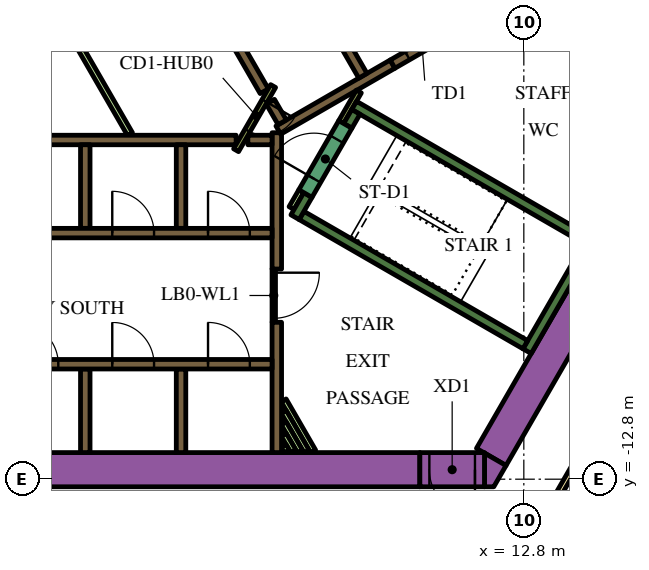
"""IFC4 building model, lengths in metres.
Left out: names, types, materials, properties, quantities, classifications, styles, units other than length and angle.
Written with IfcOpenShell. Run it as: python <this file> out.ifc"""

import sys

from ifc_helpers import new_model, si_unit, direction, frame, frame_2d, origin, place, context, subcontext, project, spatial, polyline, rectangle, outline, extrude, element, fill, save


model = new_model("IFC4")
c1 = context("Model", 3, precision=1e-05, world=origin(), true_north=direction((0.0, 1.0)))
c2 = subcontext(c1, "Body", "Model", "MODEL_VIEW")
j1 = project(units=[si_unit("LENGTHUNIT", "METRE"), si_unit("PLANEANGLEUNIT", "RADIAN")], contexts=[c1])
p1 = place(None, origin())
s1 = spatial("IfcSite", under=j1, at=p1, CompositionType="ELEMENT")
p2 = place(p1, origin())
s2 = spatial("IfcBuilding", under=s1, at=p2, CompositionType="ELEMENT")
p3 = place(p2, frame((0.0, 0.0, 114.9)))
s3 = spatial("IfcBuildingStorey", under=s2, at=p3, CompositionType="ELEMENT", Elevation=114.9)
p4 = place(p3, frame((6.776, 13.364, 0.0), z_axis=(0.0, 0.0, 1.0), x_axis=(0.500004177138, -0.8660229921, 0.0)))
e1 = element("IfcWall", 1, at=p4, inside=s3, PredefinedType="SOLIDWALL", context=c2, shape_type="SweptSolid", body=[
    extrude(rectangle(XDim=20.204, YDim=0.9, at=frame_2d((10.102, 0.0))), origin(), (0.0, 0.0, 1.0), 3.9),
])
p5 = place(p3, frame((11.943, -12.214, 0.0), z_axis=(0.0, 0.0, 1.0), x_axis=(0.49998092645, 0.866036415623, 0.0)))
e2 = element("IfcWall", 2, at=p5, inside=s3, PredefinedType="SOLIDWALL", context=c2, shape_type="SweptSolid", body=[
    extrude(rectangle(XDim=8.83, YDim=0.9, at=frame_2d((4.415, 0.0))), origin(), (0.0, 0.0, 1.0), 3.9),
])
p6 = place(p3, origin())
e3 = element("IfcWall", 3, at=p6, inside=s3, PredefinedType="SOLIDWALL", context=c2, shape_type="SweptSolid", body=[
    extrude(outline(polyline([(12.009, -13.0), (11.764, -13.0), (11.764, -12.113), (12.332, -12.441), (12.009, -13.0)])), origin(), (0.0, 0.0, 1.0), 3.9),
])
p7 = place(p3, frame((-12.019, -12.55, 0.0), z_axis=(0.0, 0.0, 1.0), x_axis=(1.0, 0.0, 0.0)))
e4 = element("IfcWall", 4, at=p7, inside=s3, PredefinedType="SOLIDWALL", context=c2, shape_type="SweptSolid", body=[
    extrude(rectangle(XDim=22.083, YDim=0.9, at=frame_2d((11.042, 0.0))), origin(), (0.0, 0.0, 1.0), 3.9),
])
p8 = place(p3, frame((12.885, -9.431, 0.0), z_axis=(0.0, 0.0, 1.0), x_axis=(0.500020560727, 0.866013532718, 0.0)))
e5 = element("IfcWall", 5, at=p8, inside=s3, PredefinedType="SOLIDWALL", context=c2, shape_type="SweptSolid", body=[
    extrude(rectangle(XDim=3.45, YDim=0.25, at=frame_2d((1.725, 0.0))), origin(), (0.0, 0.0, 1.0), 3.9),
])
p9 = place(p3, frame((12.84, -9.261, 0.0), z_axis=(0.0, 0.0, 1.0), x_axis=(-0.866013990052, 0.500019768644, 0.0)))
e6 = element("IfcWall", 6, at=p9, inside=s3, PredefinedType="SOLIDWALL", context=c2, shape_type="SweptSolid", body=[
    extrude(rectangle(XDim=6.8, YDim=0.25, at=frame_2d((3.4, 0.0))), origin(), (0.0, 0.0, 1.0), 3.9),
])
p10 = place(p3, frame((6.78, -5.906, 0.0), z_axis=(0.0, 0.0, 1.0), x_axis=(0.500223362819, 0.865896406789, 0.0)))
e7 = element("IfcWall", 7, at=p10, inside=s3, PredefinedType="SOLIDWALL", context=c2, shape_type="SweptSolid", body=[
    extrude(rectangle(XDim=0.675, YDim=0.25, at=frame_2d((0.337, 0.0))), origin(), (0.0, 0.0, 1.0), 3.9),
])
p11 = place(p3, frame((8.334, -2.964, 0.0), z_axis=(0.0, 0.0, 1.0), x_axis=(0.866016039709, -0.500016218704, 0.0)))
e8 = element("IfcWall", 8, at=p11, inside=s3, PredefinedType="SOLIDWALL", context=c2, shape_type="SweptSolid", body=[
    extrude(rectangle(XDim=7.05, YDim=0.25, at=frame_2d((3.525, 0.0))), origin(), (0.0, 0.0, 1.0), 3.9),
])
p12 = place(p3, frame((8.168, -3.503, 0.0), z_axis=(0.0, 0.0, 1.0), x_axis=(0.49972245349, 0.866185586049, 0.0)))
e9 = element("IfcWall", 9, at=p12, inside=s3, PredefinedType="SOLIDWALL", context=c2, shape_type="SweptSolid", body=[
    extrude(rectangle(XDim=0.425, YDim=0.25, at=frame_2d((0.212, 0.0))), origin(), (0.0, 0.0, 1.0), 3.9),
])
p13 = place(p3, frame((-5.259, -3.875, 0.0), z_axis=(0.0, 0.0, 1.0), x_axis=(1.0, 0.0, 0.0)))
e10 = element("IfcWall", 10, at=p13, inside=s3, PredefinedType="SOLIDWALL", context=c2, shape_type="SweptSolid", body=[
    extrude(rectangle(XDim=10.489, YDim=0.25, at=frame_2d((5.244, 0.0))), origin(), (0.0, 0.0, 1.0), 3.9),
])
for number, where, z_axis, x_axis in (
    (11, (3.78, -4.0, 0.0), (0.0, 0.0, 1.0), (0.0, -1.0, 0.0)),
    (12, (1.26, -4.0, 0.0), (0.0, 0.0, 1.0), (0.0, -1.0, 0.0)),
):
    element("IfcWall", number, at=place(p3, frame(where, z_axis=z_axis, x_axis=x_axis)), inside=s3, PredefinedType="SOLIDWALL", context=c2, shape_type="SweptSolid", body=[
        extrude(rectangle(XDim=2.2, YDim=0.25, at=frame_2d((1.1, 0.0))), origin(), (0.0, 0.0, 1.0), 3.9),
    ])
p14 = place(p3, frame((6.3, -7.27, 0.0), z_axis=(0.0, 0.0, 1.0), x_axis=(0.0, 1.0, 0.0)))
e13 = element("IfcWall", 13, at=p14, inside=s3, PredefinedType="SOLIDWALL", context=c2, shape_type="SweptSolid", body=[
    extrude(rectangle(XDim=3.586, YDim=0.25, at=frame_2d((1.793, 0.0))), origin(), (0.0, 0.0, 1.0), 3.9),
])
p15 = place(p3, frame((6.3, -12.1, 0.0), z_axis=(0.0, 0.0, 1.0), x_axis=(0.0, 1.0, 0.0)))
e14 = element("IfcWall", 14, at=p15, inside=s3, PredefinedType="SOLIDWALL", context=c2, shape_type="SweptSolid", body=[
    extrude(rectangle(XDim=3.428, YDim=0.25, at=frame_2d((1.714, 0.0))), origin(), (0.0, 0.0, 1.0), 3.9),
])
p16 = place(p3, frame((5.538, -3.875, 0.0), z_axis=(0.0, 0.0, 1.0), x_axis=(1.0, 0.0, 0.0)))
e15 = element("IfcWall", 15, at=p16, inside=s3, PredefinedType="SOLIDWALL", context=c2, shape_type="SweptSolid", body=[
    extrude(rectangle(XDim=0.637, YDim=0.25, at=frame_2d((0.318, 0.0))), origin(), (0.0, 0.0, 1.0), 3.9),
])
for number, where, z_axis, x_axis in (
    (16, (3.78, -12.1, 0.0), (0.0, 0.0, 1.0), (0.0, 1.0, 0.0)),
    (17, (1.26, -12.1, 0.0), (0.0, 0.0, 1.0), (0.0, 1.0, 0.0)),
):
    element("IfcWall", number, at=place(p3, frame(where, z_axis=z_axis, x_axis=x_axis)), inside=s3, PredefinedType="SOLIDWALL", context=c2, shape_type="SweptSolid", body=[
        extrude(rectangle(XDim=2.2, YDim=0.25, at=frame_2d((1.1, 0.0))), origin(), (0.0, 0.0, 1.0), 3.9),
    ])
p17 = place(p3, frame((9.346, -1.879, 0.0), z_axis=(0.0, 0.0, 1.0), x_axis=(-0.866048528039, -0.499959945477, 0.0)))
e18 = element("IfcWall", 18, at=p17, inside=s3, PredefinedType="SOLIDWALL", context=c2, shape_type="SweptSolid", body=[
    extrude(rectangle(XDim=3.47, YDim=0.25, at=frame_2d((1.735, 0.0))), origin(), (0.0, 0.0, 1.0), 3.9),
])
p18 = place(p3, frame((6.13, -2.867, 0.0), z_axis=(0.0, 0.0, 1.0), x_axis=(0.500160776593, -0.865932559475, 0.0)))
e19 = element("IfcWall", 19, at=p18, inside=s3, PredefinedType="SOLIDWALL", context=c2, shape_type="SweptSolid", body=[
    extrude(rectangle(XDim=0.627, YDim=0.25, at=frame_2d((0.313, 0.0))), origin(), (0.0, 0.0, 1.0), 3.9),
])
p19 = place(p3, frame((5.97, -2.591, 0.0), z_axis=(0.0, 0.0, 1.0), x_axis=(-0.499994469932, 0.866028596547, 0.0)))
e20 = element("IfcWall", 20, at=p19, inside=s3, PredefinedType="SOLIDWALL", context=c2, shape_type="SweptSolid", body=[
    extrude(rectangle(XDim=10.488, YDim=0.25, at=frame_2d((5.244, 0.0))), origin(), (0.0, 0.0, 1.0), 3.9),
])
p20 = place(p3, frame((6.48, -10.726, 0.0), z_axis=(0.0, 0.0, 1.0), x_axis=(0.500017819788, -0.86601511528, 0.0)))
e21 = element("IfcWall", 21, at=p20, inside=s3, PredefinedType="PARTITIONING", context=c2, shape_type="SweptSolid", body=[
    extrude(rectangle(XDim=1.55, YDim=0.15, at=frame_2d((0.775, 0.0))), origin(), (0.0, 0.0, 1.0), 2.75),
])
p21 = place(p3, frame((6.48, -11.026, 0.0), z_axis=(0.0, 0.0, 1.0), x_axis=(0.49995654735, -0.86605048973, 0.0)))
e22 = element("IfcWall", 22, at=p21, inside=s3, PredefinedType="PARTITIONING", context=c2, shape_type="SweptSolid", body=[
    extrude(rectangle(XDim=1.204, YDim=0.15, at=frame_2d((0.602, 0.0))), origin(), (0.0, 0.0, 1.0), 2.75),
])
p22 = place(p3, frame((6.48, -11.326, 0.0), z_axis=(0.0, 0.0, 1.0), x_axis=(0.500059337743, -0.865991142412, 0.0)))
e23 = element("IfcWall", 23, at=p22, inside=s3, PredefinedType="PARTITIONING", context=c2, shape_type="SweptSolid", body=[
    extrude(rectangle(XDim=0.857, YDim=0.15, at=frame_2d((0.429, 0.0))), origin(), (0.0, 0.0, 1.0), 2.75),
])
p23 = place(p3, frame((6.48, -11.626, 0.0), z_axis=(0.0, 0.0, 1.0), x_axis=(0.500301480982, -0.865851273677, 0.0)))
e24 = element("IfcWall", 24, at=p23, inside=s3, PredefinedType="PARTITIONING", context=c2, shape_type="SweptSolid", body=[
    extrude(rectangle(XDim=0.511, YDim=0.15, at=frame_2d((0.255, 0.0))), origin(), (0.0, 0.0, 1.0), 2.75),
])
p24 = place(p3, frame((6.48, -11.926, 0.0), z_axis=(0.0, 0.0, 1.0), x_axis=(0.500450775723, -0.86576499183, 0.0)))
e25 = element("IfcWall", 25, at=p24, inside=s3, PredefinedType="PARTITIONING", context=c2, shape_type="SweptSolid", body=[
    extrude(rectangle(XDim=0.164, YDim=0.15, at=frame_2d((0.082, 0.0))), origin(), (0.0, 0.0, 1.0), 2.75),
])
p25 = place(p3, frame((6.945, -5.222, 0.0), z_axis=(0.0, 0.0, 1.0), x_axis=(-0.499818422106, -0.866130212453, 0.0)))
e26 = element("IfcWall", 26, at=p25, inside=s3, PredefinedType="PARTITIONING", context=c2, shape_type="SweptSolid", body=[
    extrude(rectangle(XDim=0.514, YDim=0.15, at=frame_2d((0.257, 0.0))), origin(), (0.0, 0.0, 1.0), 2.75),
])
p26 = place(p3, frame((8.459, -2.599, 0.0), z_axis=(0.0, 0.0, 1.0), x_axis=(-0.500041054325, -0.866001699761, 0.0)))
e27 = element("IfcWall", 27, at=p26, inside=s3, PredefinedType="PARTITIONING", context=c2, shape_type="SweptSolid", body=[
    extrude(rectangle(XDim=0.929, YDim=0.15, at=frame_2d((0.464, 0.0))), origin(), (0.0, 0.0, 1.0), 3.9),
])
p27 = place(p3, frame((2.435, -3.718, 0.0), z_axis=(0.0, 0.0, 1.0), x_axis=(-0.499985176046, 0.866033962229, 0.0)))
e28 = element("IfcWall", 28, at=p27, inside=s3, PredefinedType="PARTITIONING", context=c2, shape_type="SweptSolid", body=[
    extrude(rectangle(XDim=8.875, YDim=0.15, at=frame_2d((4.438, 0.0))), origin(), (0.0, 0.0, 1.0), 2.75),
])
p28 = place(p3, frame((-6.175, -9.775, 0.0), z_axis=(0.0, 0.0, 1.0), x_axis=(1.0, 0.0, 0.0)))
e29 = element("IfcWall", 29, at=p28, inside=s3, PredefinedType="SOLIDWALL", context=c2, shape_type="SweptSolid", body=[
    extrude(rectangle(XDim=12.35, YDim=0.25, at=frame_2d((6.175, 0.0))), origin(), (0.0, 0.0, 1.0), 3.9),
])
p29 = place(p28, frame((0.585, 0.0, 0.0)))
e30 = element("IfcOpeningElement", 30, at=p29, cuts=e29, PredefinedType="OPENING", context=c2, shape_type="SweptSolid", body=[
    extrude(rectangle(XDim=1.1, YDim=2.1, at=frame_2d((0.55, 1.05))), frame((0.0, 0.135, 0.0), z_axis=(0.0, -1.0, 0.0), x_axis=(1.0, 0.0, 0.0)), (0.0, 0.0, 1.0), 0.27),
])
p30 = place(p28, frame((3.105, 0.0, 0.0)))
e31 = element("IfcOpeningElement", 31, at=p30, cuts=e29, PredefinedType="OPENING", context=c2, shape_type="SweptSolid", body=[
    extrude(rectangle(XDim=1.1, YDim=2.1, at=frame_2d((0.55, 1.05))), frame((0.0, 0.135, 0.0), z_axis=(0.0, -1.0, 0.0), x_axis=(1.0, 0.0, 0.0)), (0.0, 0.0, 1.0), 0.27),
])
p31 = place(p28, frame((5.625, 0.0, 0.0)))
e32 = element("IfcOpeningElement", 32, at=p31, cuts=e29, PredefinedType="OPENING", context=c2, shape_type="SweptSolid", body=[
    extrude(rectangle(XDim=1.1, YDim=2.1, at=frame_2d((0.55, 1.05))), frame((0.0, 0.135, 0.0), z_axis=(0.0, -1.0, 0.0), x_axis=(1.0, 0.0, 0.0)), (0.0, 0.0, 1.0), 0.27),
])
p32 = place(p28, frame((8.145, 0.0, 0.0)))
e33 = element("IfcOpeningElement", 33, at=p32, cuts=e29, PredefinedType="OPENING", context=c2, shape_type="SweptSolid", body=[
    extrude(rectangle(XDim=1.1, YDim=2.1, at=frame_2d((0.55, 1.05))), frame((0.0, 0.135, 0.0), z_axis=(0.0, -1.0, 0.0), x_axis=(1.0, 0.0, 0.0)), (0.0, 0.0, 1.0), 0.27),
])
p33 = place(p28, frame((10.665, 0.0, 0.0)))
e34 = element("IfcOpeningElement", 34, at=p33, cuts=e29, PredefinedType="OPENING", context=c2, shape_type="SweptSolid", body=[
    extrude(rectangle(XDim=1.1, YDim=2.1, at=frame_2d((0.55, 1.05))), frame((0.0, 0.135, 0.0), z_axis=(0.0, -1.0, 0.0), x_axis=(1.0, 0.0, 0.0)), (0.0, 0.0, 1.0), 0.27),
])
p34 = place(p3, frame((-6.175, -6.325, 0.0), z_axis=(0.0, 0.0, 1.0), x_axis=(1.0, 0.0, 0.0)))
e35 = element("IfcWall", 35, at=p34, inside=s3, PredefinedType="SOLIDWALL", context=c2, shape_type="SweptSolid", body=[
    extrude(rectangle(XDim=12.35, YDim=0.25, at=frame_2d((6.175, 0.0))), origin(), (0.0, 0.0, 1.0), 3.9),
])
p35 = place(p34, frame((3.205, 0.0, 0.0)))
e36 = element("IfcOpeningElement", 36, at=p35, cuts=e35, PredefinedType="OPENING", context=c2, shape_type="SweptSolid", body=[
    extrude(rectangle(XDim=0.9, YDim=2.1, at=frame_2d((0.45, 1.05))), frame((0.0, 0.135, 0.0), z_axis=(0.0, -1.0, 0.0), x_axis=(1.0, 0.0, 0.0)), (0.0, 0.0, 1.0), 0.27),
])
p36 = place(p34, frame((8.145, 0.0, 0.0)))
e37 = element("IfcOpeningElement", 37, at=p36, cuts=e35, PredefinedType="OPENING", context=c2, shape_type="SweptSolid", body=[
    extrude(rectangle(XDim=1.1, YDim=2.1, at=frame_2d((0.55, 1.05))), frame((0.0, 0.135, 0.0), z_axis=(0.0, -1.0, 0.0), x_axis=(1.0, 0.0, 0.0)), (0.0, 0.0, 1.0), 0.27),
])
p37 = place(p34, frame((10.665, 0.0, 0.0)))
e38 = element("IfcOpeningElement", 38, at=p37, cuts=e35, PredefinedType="OPENING", context=c2, shape_type="SweptSolid", body=[
    extrude(rectangle(XDim=1.1, YDim=2.1, at=frame_2d((0.55, 1.05))), frame((0.0, 0.135, 0.0), z_axis=(0.0, -1.0, 0.0), x_axis=(1.0, 0.0, 0.0)), (0.0, 0.0, 1.0), 0.27),
])
p38 = place(p3, frame((8.565, -2.185, 0.0), z_axis=(0.0, 0.0, 1.0), x_axis=(-0.499997954832, 0.866026584559, 0.0)))
e39 = element("IfcWall", 39, at=p38, inside=s3, PredefinedType="SOLIDWALL", context=c2, shape_type="SweptSolid", body=[
    extrude(rectangle(XDim=12.35, YDim=0.25, at=frame_2d((6.175, 0.0))), origin(), (0.0, 0.0, 1.0), 3.9),
])
p39 = place(p38, frame((5.725, 0.0, 0.0)))
e40 = element("IfcOpeningElement", 40, at=p39, cuts=e39, PredefinedType="OPENING", context=c2, shape_type="SweptSolid", body=[
    extrude(rectangle(XDim=0.9, YDim=2.1, at=frame_2d((0.45, 1.05))), frame((0.0, 0.135, 0.0), z_axis=(0.0, -1.0, 0.0), x_axis=(1.0, 0.0, 0.0)), (0.0, 0.0, 1.0), 0.27),
])
p40 = place(p3, frame((7.053, -5.284, 0.0), z_axis=(0.0, 0.0, 1.0), x_axis=(0.500078061341, 0.865980330357, 0.0)))
e41 = element("IfcWall", 41, at=p40, inside=s3, PredefinedType="SOLIDWALL", context=c2, shape_type="SweptSolid", body=[
    extrude(rectangle(XDim=2.1, YDim=0.4, at=frame_2d((1.05, 0.0))), origin(), (0.0, 0.0, 1.0), 3.9),
])
p41 = place(p40, frame((0.45, 0.0, 0.0)))
e42 = element("IfcOpeningElement", 42, at=p41, cuts=e41, PredefinedType="OPENING", context=c2, shape_type="SweptSolid", body=[
    extrude(rectangle(XDim=1.2, YDim=2.1, at=frame_2d((0.6, 1.05))), frame((0.0, 0.21, 0.0), z_axis=(0.0, -1.0, 0.0), x_axis=(1.0, 0.0, 0.0)), (0.0, 0.0, 1.0), 0.42),
])
p42 = place(p3, frame((9.346, -1.879, 0.0), z_axis=(0.0, 0.0, 1.0), x_axis=(0.866047807691, 0.499961193289, 0.0)))
e43 = element("IfcWall", 43, at=p42, inside=s3, PredefinedType="SOLIDWALL", context=c2, shape_type="SweptSolid", body=[
    extrude(rectangle(XDim=1.8, YDim=0.25, at=frame_2d((0.9, 0.0))), origin(), (0.0, 0.0, 1.0), 3.9),
])
p43 = place(p42, frame((0.45, 0.0, 0.0)))
e44 = element("IfcOpeningElement", 44, at=p43, cuts=e43, PredefinedType="OPENING", context=c2, shape_type="SweptSolid", body=[
    extrude(rectangle(XDim=0.9, YDim=2.1, at=frame_2d((0.45, 1.05))), frame((0.0, 0.135, 0.0), z_axis=(0.0, -1.0, 0.0), x_axis=(1.0, 0.0, 0.0)), (0.0, 0.0, 1.0), 0.27),
])
p44 = place(p3, frame((6.203, -2.456, 0.0), z_axis=(0.0, 0.0, 1.0), x_axis=(-0.500043961785, -0.866000020948, 0.0)))
e45 = element("IfcWall", 45, at=p44, inside=s3, PredefinedType="PARTITIONING", context=c2, shape_type="SweptSolid", body=[
    extrude(rectangle(XDim=1.95, YDim=0.15, at=frame_2d((0.975, 0.0))), origin(), (0.0, 0.0, 1.0), 3.9),
])
p45 = place(p44, frame((0.45, 0.0, 0.0)))
e46 = element("IfcOpeningElement", 46, at=p45, cuts=e45, PredefinedType="OPENING", context=c2, shape_type="SweptSolid", body=[
    extrude(rectangle(XDim=0.9, YDim=2.1, at=frame_2d((0.45, 1.05))), frame((0.0, 0.085, 0.0), z_axis=(0.0, -1.0, 0.0), x_axis=(1.0, 0.0, 0.0)), (0.0, 0.0, 1.0), 0.17),
])
p46 = place(p3, frame((6.22, -7.266, 0.0), z_axis=(0.0, 0.0, 1.0), x_axis=(0.0, -1.0, 0.0)))
e47 = element("IfcWall", 47, at=p46, inside=s3, PredefinedType="PARTITIONING", context=c2, shape_type="SweptSolid", body=[
    extrude(rectangle(XDim=1.4, YDim=0.09, at=frame_2d((0.7, 0.0))), origin(), (0.0, 0.0, 1.0), 2.75),
])
p47 = place(p46, frame((0.1, 0.0, 0.0)))
e48 = element("IfcOpeningElement", 48, at=p47, cuts=e47, PredefinedType="OPENING", context=c2, shape_type="SweptSolid", body=[
    extrude(rectangle(XDim=1.2, YDim=2.1, at=frame_2d((0.6, 1.05))), frame((0.0, 0.055, 0.0), z_axis=(0.0, -1.0, 0.0), x_axis=(1.0, 0.0, 0.0)), (0.0, 0.0, 1.0), 0.11),
])
p48 = place(p3, frame((11.764, -12.55, 0.0), z_axis=(0.0, 0.0, 1.0), x_axis=(-1.0, 0.0, 0.0)))
e49 = element("IfcWall", 49, at=p48, inside=s3, PredefinedType="SOLIDWALL", context=c2, shape_type="SweptSolid", body=[
    extrude(rectangle(XDim=1.7, YDim=0.9, at=frame_2d((0.85, 0.0))), origin(), (0.0, 0.0, 1.0), 3.9),
])
p49 = place(p48, frame((0.25, 0.0, 0.0)))
e50 = element("IfcOpeningElement", 50, at=p49, cuts=e49, PredefinedType="OPENING", context=c2, shape_type="SweptSolid", body=[
    extrude(rectangle(XDim=1.2, YDim=2.1, at=frame_2d((0.6, 1.05))), frame((0.0, 0.46, 0.0), z_axis=(0.0, -1.0, 0.0), x_axis=(1.0, 0.0, 0.0)), (0.0, 0.0, 1.0), 0.92),
])
p50 = place(p3, frame((6.163, 18.475, 0.0), z_axis=(0.0, 0.0, 1.0), x_axis=(0.500001317485, -0.866024643133, 0.0)))
e51 = element("IfcWall", 51, at=p50, inside=s3, PredefinedType="PARTITIONING", context=c2, shape_type="SweptSolid", body=[
    extrude(rectangle(XDim=25.767, YDim=0.15, at=frame_2d((12.883, 0.0))), origin(), (0.0, 0.0, 1.0), 2.75),
])
p51 = place(p50, frame((24.241, 0.0, 0.0)))
e52 = element("IfcOpeningElement", 52, at=p51, cuts=e51, PredefinedType="OPENING", context=c2, shape_type="SweptSolid", body=[
    extrude(rectangle(XDim=1.0, YDim=2.1, at=frame_2d((0.5, 1.05))), frame((0.0, 0.085, 0.0), z_axis=(0.0, -1.0, 0.0), x_axis=(1.0, 0.0, 0.0)), (0.0, 0.0, 1.0), 0.17),
])
p52 = place(p50, frame((13.144, 0.0, 0.0)))
e53 = element("IfcOpeningElement", 53, at=p52, cuts=e51, PredefinedType="OPENING", context=c2, shape_type="SweptSolid", body=[
    extrude(rectangle(XDim=1.0, YDim=2.1, at=frame_2d((0.5, 1.05))), frame((0.0, 0.085, 0.0), z_axis=(0.0, -1.0, 0.0), x_axis=(1.0, 0.0, 0.0)), (0.0, 0.0, 1.0), 0.17),
])
p53 = place(p50, frame((10.874, 0.0, 0.0)))
e54 = element("IfcOpeningElement", 54, at=p53, cuts=e51, PredefinedType="OPENING", context=c2, shape_type="SweptSolid", body=[
    extrude(rectangle(XDim=0.9, YDim=2.1, at=frame_2d((0.45, 1.05))), frame((0.0, 0.085, 0.0), z_axis=(0.0, -1.0, 0.0), x_axis=(1.0, 0.0, 0.0)), (0.0, 0.0, 1.0), 0.17),
])
p54 = place(p50, frame((3.718, 0.0, 0.0)))
e55 = element("IfcOpeningElement", 55, at=p54, cuts=e51, PredefinedType="OPENING", context=c2, shape_type="SweptSolid", body=[
    extrude(rectangle(XDim=1.0, YDim=2.1, at=frame_2d((0.5, 1.05))), frame((0.0, 0.085, 0.0), z_axis=(0.0, -1.0, 0.0), x_axis=(1.0, 0.0, 0.0)), (0.0, 0.0, 1.0), 0.17),
])
p55 = place(p50, frame((2.411, 0.0, 0.0)))
e56 = element("IfcOpeningElement", 56, at=p55, cuts=e51, PredefinedType="OPENING", context=c2, shape_type="SweptSolid", body=[
    extrude(rectangle(XDim=1.0, YDim=2.1, at=frame_2d((0.5, 1.05))), frame((0.0, 0.085, 0.0), z_axis=(0.0, -1.0, 0.0), x_axis=(1.0, 0.0, 0.0)), (0.0, 0.0, 1.0), 0.17),
])
p56 = place(p3, frame((15.587, -9.952, 0.0), z_axis=(0.0, 0.0, 1.0), x_axis=(-0.500016618951, -0.866015808616, 0.0)))
e57 = element("IfcWall", 57, at=p56, inside=s3, PredefinedType="PARTITIONING", context=c2, shape_type="SweptSolid", body=[
    extrude(rectangle(XDim=5.268, YDim=0.15, at=frame_2d((2.634, 0.0))), origin(), (0.0, 0.0, 1.0), 2.75),
])
p57 = place(p31, origin())
e58 = element("IfcDoor", 58, at=p57, inside=s3, OperationType="DOUBLE_DOOR_SLIDING", PredefinedType="DOOR", context=c2, shape_type="SweptSolid", body=[
    extrude(rectangle(XDim=1.1, YDim=2.1, at=frame_2d((0.55, 1.05))), frame((0.0, 0.025, 0.0), z_axis=(0.0, -1.0, 0.0), x_axis=(1.0, 0.0, 0.0)), (0.0, 0.0, 1.0), 0.05),
])
fill(e32, e58)
p58 = place(p32, origin())
e59 = element("IfcDoor", 59, at=p58, inside=s3, OperationType="DOUBLE_DOOR_SLIDING", PredefinedType="DOOR", context=c2, shape_type="SweptSolid", body=[
    extrude(rectangle(XDim=1.1, YDim=2.1, at=frame_2d((0.55, 1.05))), frame((0.0, 0.025, 0.0), z_axis=(0.0, -1.0, 0.0), x_axis=(1.0, 0.0, 0.0)), (0.0, 0.0, 1.0), 0.05),
])
fill(e33, e59)
p59 = place(p33, origin())
e60 = element("IfcDoor", 60, at=p59, inside=s3, OperationType="DOUBLE_DOOR_SLIDING", PredefinedType="DOOR", context=c2, shape_type="SweptSolid", body=[
    extrude(rectangle(XDim=1.1, YDim=2.1, at=frame_2d((0.55, 1.05))), frame((0.0, 0.025, 0.0), z_axis=(0.0, -1.0, 0.0), x_axis=(1.0, 0.0, 0.0)), (0.0, 0.0, 1.0), 0.05),
])
fill(e34, e60)
p60 = place(p36, origin())
e61 = element("IfcDoor", 61, at=p60, inside=s3, OperationType="DOUBLE_DOOR_SLIDING", PredefinedType="DOOR", context=c2, shape_type="SweptSolid", body=[
    extrude(rectangle(XDim=1.1, YDim=2.1, at=frame_2d((0.55, 1.05))), frame((0.0, 0.025, 0.0), z_axis=(0.0, -1.0, 0.0), x_axis=(1.0, 0.0, 0.0)), (0.0, 0.0, 1.0), 0.05),
])
fill(e37, e61)
p61 = place(p37, origin())
e62 = element("IfcDoor", 62, at=p61, inside=s3, OperationType="DOUBLE_DOOR_SLIDING", PredefinedType="DOOR", context=c2, shape_type="SweptSolid", body=[
    extrude(rectangle(XDim=1.1, YDim=2.1, at=frame_2d((0.55, 1.05))), frame((0.0, 0.025, 0.0), z_axis=(0.0, -1.0, 0.0), x_axis=(1.0, 0.0, 0.0)), (0.0, 0.0, 1.0), 0.05),
])
fill(e38, e62)
p62 = place(p41, origin())
e63 = element("IfcDoor", 63, at=p62, inside=s3, OperationType="SINGLE_SWING_LEFT", PredefinedType="DOOR", context=c2, shape_type="SweptSolid", body=[
    extrude(rectangle(XDim=1.2, YDim=2.1, at=frame_2d((0.6, 1.05))), frame((0.0, 0.025, 0.0), z_axis=(0.0, -1.0, 0.0), x_axis=(1.0, 0.0, 0.0)), (0.0, 0.0, 1.0), 0.05),
])
fill(e42, e63)
p63 = place(p43, origin())
e64 = element("IfcDoor", 64, at=p63, inside=s3, OperationType="SINGLE_SWING_LEFT", PredefinedType="DOOR", context=c2, shape_type="SweptSolid", body=[
    extrude(rectangle(XDim=0.9, YDim=2.1, at=frame_2d((0.45, 1.05))), frame((0.0, 0.025, 0.0), z_axis=(0.0, -1.0, 0.0), x_axis=(1.0, 0.0, 0.0)), (0.0, 0.0, 1.0), 0.05),
])
fill(e44, e64)
p64 = place(p45, origin())
e65 = element("IfcDoor", 65, at=p64, inside=s3, OperationType="SINGLE_SWING_LEFT", PredefinedType="DOOR", context=c2, shape_type="SweptSolid", body=[
    extrude(rectangle(XDim=0.9, YDim=2.1, at=frame_2d((0.45, 1.05))), frame((0.0, 0.025, 0.0), z_axis=(0.0, -1.0, 0.0), x_axis=(1.0, 0.0, 0.0)), (0.0, 0.0, 1.0), 0.05),
])
fill(e46, e65)
p65 = place(p47, origin())
e66 = element("IfcDoor", 66, at=p65, inside=s3, OperationType="SINGLE_SWING_LEFT", PredefinedType="DOOR", context=c2, shape_type="SweptSolid", body=[
    extrude(rectangle(XDim=1.2, YDim=2.1, at=frame_2d((0.6, 1.05))), frame((0.0, 0.025, 0.0), z_axis=(0.0, -1.0, 0.0), x_axis=(1.0, 0.0, 0.0)), (0.0, 0.0, 1.0), 0.05),
])
fill(e48, e66)
p66 = place(p49, origin())
e67 = element("IfcDoor", 67, at=p66, inside=s3, OperationType="SINGLE_SWING_LEFT", PredefinedType="DOOR", context=c2, shape_type="SweptSolid", body=[
    extrude(rectangle(XDim=1.2, YDim=2.1, at=frame_2d((0.6, 1.05))), frame((0.0, 0.025, 0.0), z_axis=(0.0, -1.0, 0.0), x_axis=(1.0, 0.0, 0.0)), (0.0, 0.0, 1.0), 0.05),
])
fill(e50, e67)
save(model, sys.argv[1])
